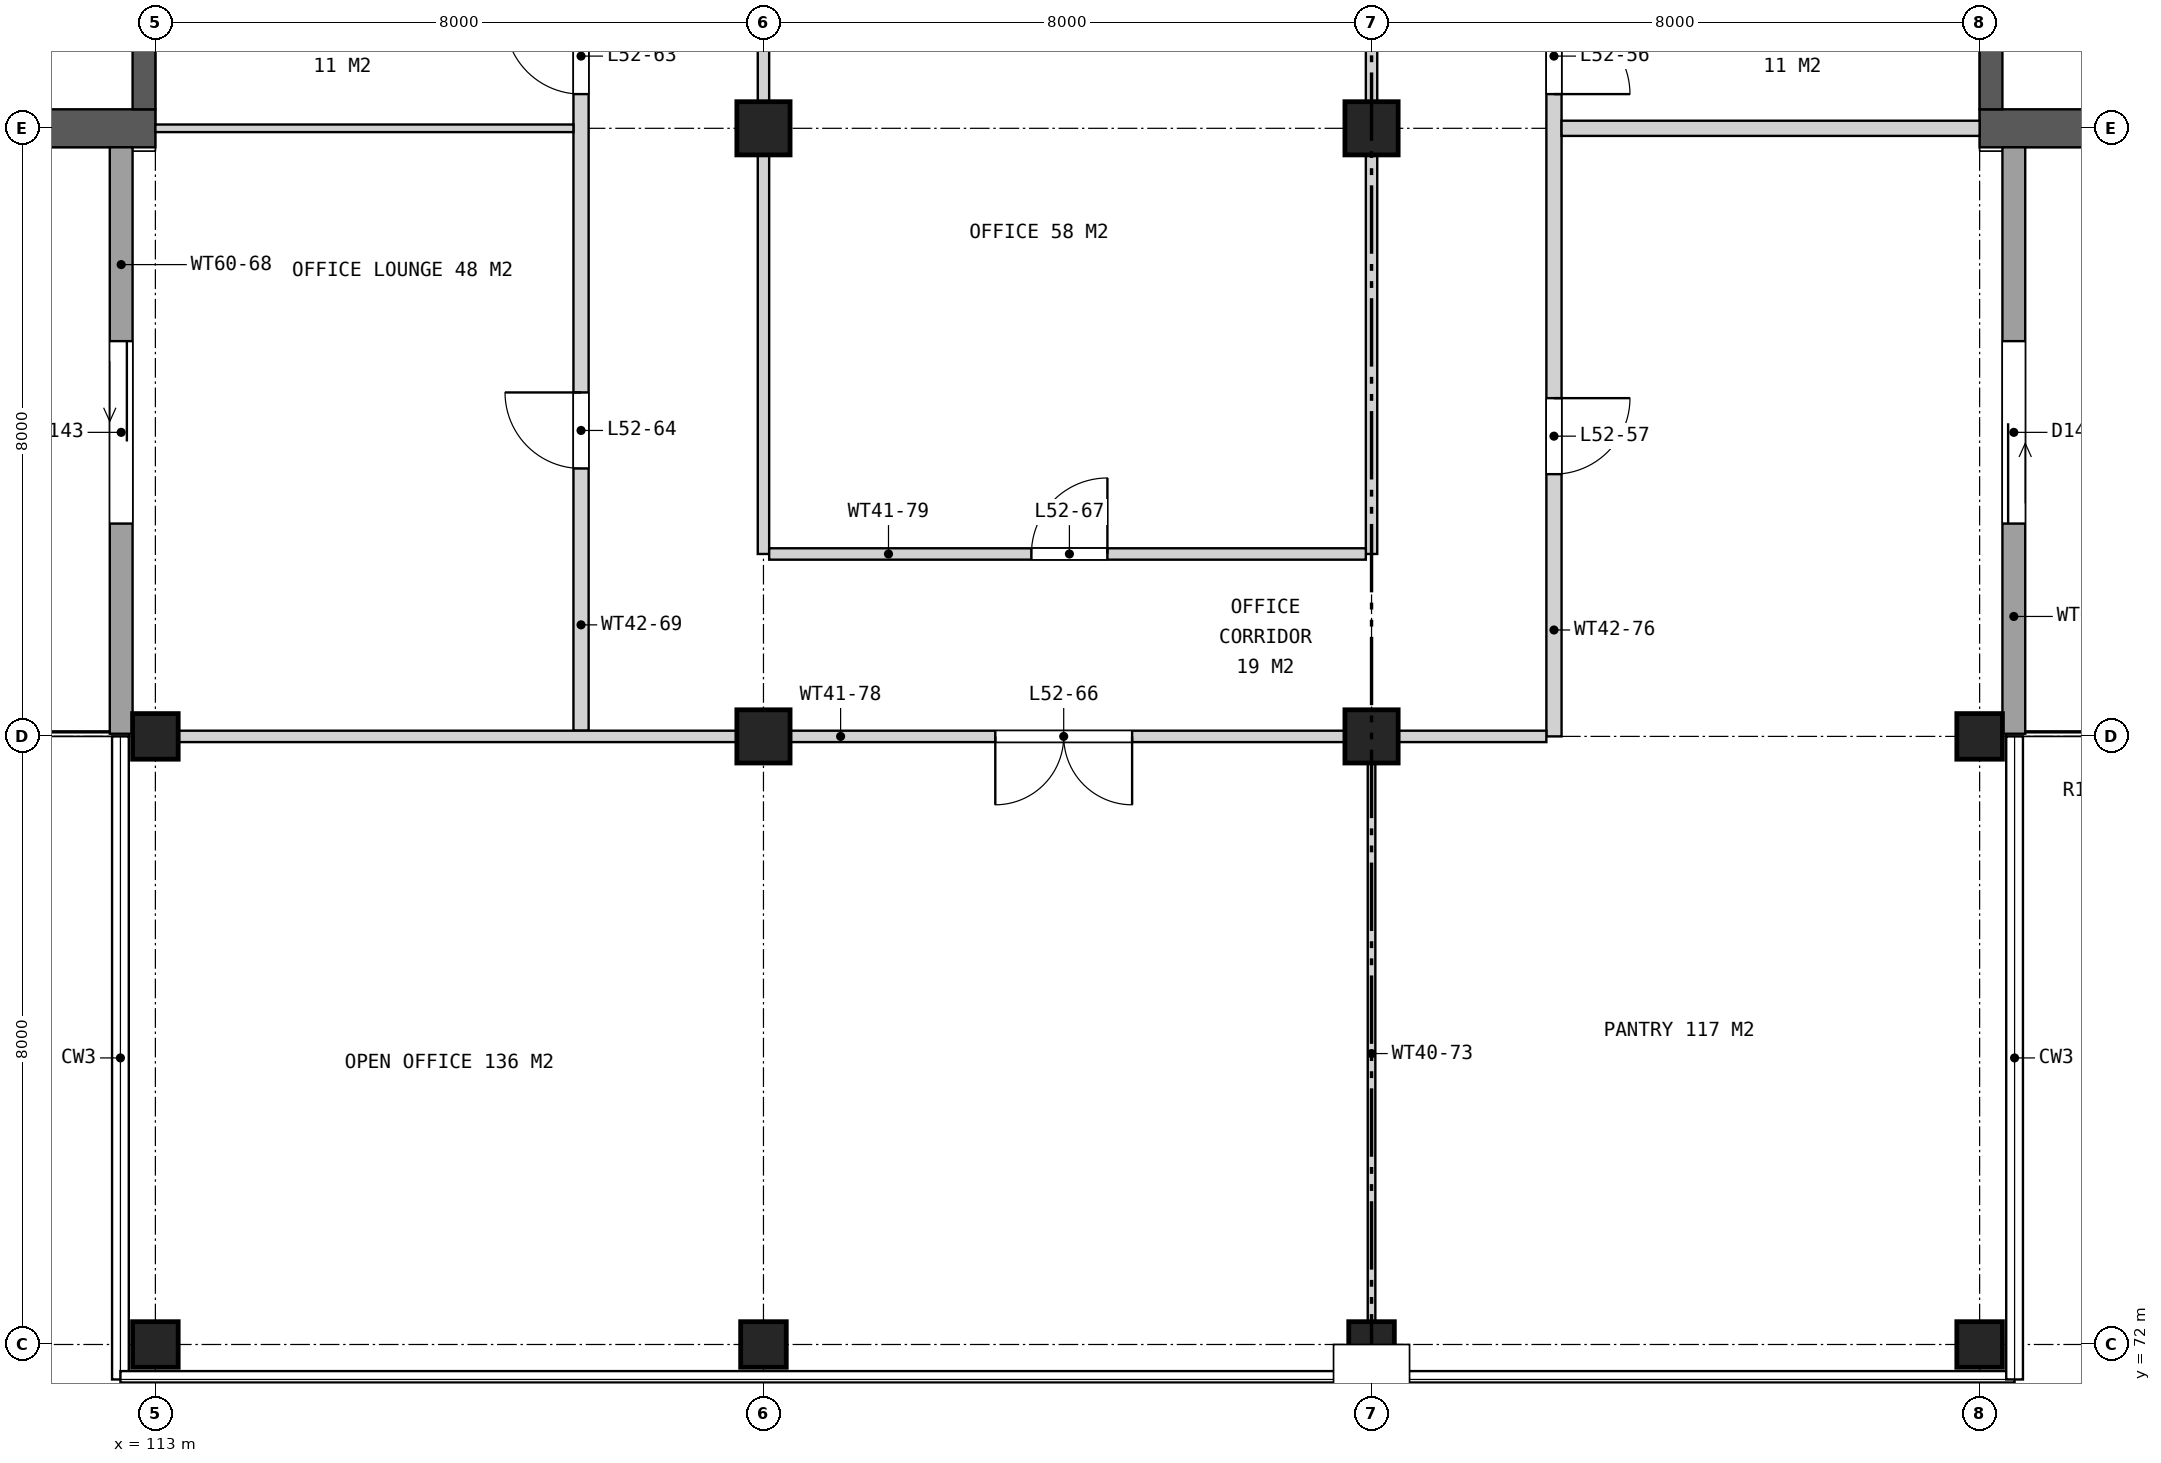
"""IFC4 building model, lengths in metres.
Left out: names, types, materials, properties, quantities, classifications, styles, units other than length and angle.
Written with IfcOpenShell. Run it as: python <this file> out.ifc"""

import sys

from ifc_helpers import new_model, si_unit, direction, frame, frame_2d, origin, origin_2d, place, context, subcontext, project, spatial, rectangle, extrude, element, fill, save


model = new_model("IFC4")
c1 = context("Model", 3, precision=1e-05, world=origin(), true_north=direction((0.0, 1.0)))
c2 = subcontext(c1, "Body", "Model", "MODEL_VIEW")
j1 = project(units=[si_unit("LENGTHUNIT", "METRE"), si_unit("PLANEANGLEUNIT", "RADIAN")], contexts=[c1])
p1 = place(None, origin())
s1 = spatial("IfcSite", under=j1, at=p1, CompositionType="ELEMENT")
p2 = place(p1, origin())
s2 = spatial("IfcBuilding", under=s1, at=p2, CompositionType="ELEMENT")
p3 = place(p2, frame((0.0, 0.0, 245.1)))
s3 = spatial("IfcBuildingStorey", under=s2, at=p3, CompositionType="ELEMENT", Elevation=245.1)
for number, where, z_axis, x_axis in (
    (1, (113.0, 72.0, 0.0), (0.0, 0.0, 1.0), (1.0, 0.0, 0.0)),
    (2, (113.0, 80.0, 0.0), (0.0, 0.0, 1.0), (1.0, 0.0, 0.0)),
    (3, (121.0, 72.0, 0.0), (0.0, 0.0, 1.0), (1.0, 0.0, 0.0)),
):
    element("IfcColumn", number, at=place(p3, frame(where, z_axis=z_axis, x_axis=x_axis)), inside=s3, PredefinedType="COLUMN", context=c2, shape_type="SweptSolid", body=[
        extrude(rectangle(XDim=0.6, YDim=0.6, at=origin_2d()), origin(), (0.0, 0.0, 1.0), 4.2),
    ])
for number, where, z_axis, x_axis in (
    (4, (121.0, 80.0, 0.0), (0.0, 0.0, 1.0), (1.0, 0.0, 0.0)),
    (5, (121.0, 88.0, 0.0), (0.0, 0.0, 1.0), (1.0, 0.0, 0.0)),
):
    element("IfcColumn", number, at=place(p3, frame(where, z_axis=z_axis, x_axis=x_axis)), inside=s3, PredefinedType="COLUMN", context=c2, shape_type="SweptSolid", body=[
        extrude(rectangle(XDim=0.7, YDim=0.7, at=origin_2d()), origin(), (0.0, 0.0, 1.0), 4.2),
    ])
p4 = place(p3, frame((129.0, 72.0, 0.0), z_axis=(0.0, 0.0, 1.0), x_axis=(1.0, 0.0, 0.0)))
e6 = element("IfcColumn", 6, at=p4, inside=s3, PredefinedType="COLUMN", context=c2, shape_type="SweptSolid", body=[
    extrude(rectangle(XDim=0.6, YDim=0.6, at=origin_2d()), origin(), (0.0, 0.0, 1.0), 4.2),
])
for number, where, z_axis, x_axis in (
    (7, (129.0, 80.0, 0.0), (0.0, 0.0, 1.0), (1.0, 0.0, 0.0)),
    (8, (129.0, 88.0, 0.0), (0.0, 0.0, 1.0), (1.0, 0.0, 0.0)),
):
    element("IfcColumn", number, at=place(p3, frame(where, z_axis=z_axis, x_axis=x_axis)), inside=s3, PredefinedType="COLUMN", context=c2, shape_type="SweptSolid", body=[
        extrude(rectangle(XDim=0.7, YDim=0.7, at=origin_2d()), origin(), (0.0, 0.0, 1.0), 4.2),
    ])
for number, where, z_axis, x_axis in (
    (9, (137.0, 72.0, 0.0), (0.0, 0.0, 1.0), (1.0, 0.0, 0.0)),
    (10, (137.0, 80.0, 0.0), (0.0, 0.0, 1.0), (1.0, 0.0, 0.0)),
):
    element("IfcColumn", number, at=place(p3, frame(where, z_axis=z_axis, x_axis=x_axis)), inside=s3, PredefinedType="COLUMN", context=c2, shape_type="SweptSolid", body=[
        extrude(rectangle(XDim=0.6, YDim=0.6, at=origin_2d()), origin(), (0.0, 0.0, 1.0), 4.2),
    ])
p5 = place(p3, frame((137.0, 88.0, 0.0), z_axis=(0.0, 0.0, 1.0), x_axis=(1.0, 0.0, 0.0)))
e11 = element("IfcWall", 11, at=p5, inside=s3, PredefinedType="SHEAR", context=c2, shape_type="SweptSolid", body=[
    extrude(rectangle(XDim=7.1, YDim=0.5, at=frame_2d((3.55, 0.0))), origin(), (0.0, 0.0, 1.0), 4.2),
])
p6 = place(p3, frame((137.15, 88.25, 0.0), z_axis=(0.0, 0.0, 1.0), x_axis=(0.0, 1.0, 0.0)))
e12 = element("IfcWall", 12, at=p6, inside=s3, PredefinedType="SHEAR", context=c2, shape_type="SweptSolid", body=[
    extrude(rectangle(XDim=6.05, YDim=0.3, at=frame_2d((3.025, 0.0))), origin(), (0.0, 0.0, 1.0), 4.2),
])
p7 = place(p3, frame((113.0, 88.0, 0.0), z_axis=(0.0, 0.0, 1.0), x_axis=(-1.0, 0.0, 0.0)))
e13 = element("IfcWall", 13, at=p7, inside=s3, PredefinedType="SHEAR", context=c2, shape_type="SweptSolid", body=[
    extrude(rectangle(XDim=7.1, YDim=0.5, at=frame_2d((3.55, 0.0))), origin(), (0.0, 0.0, 1.0), 4.2),
])
p8 = place(p3, frame((112.85, 94.3, 0.0), z_axis=(0.0, 0.0, 1.0), x_axis=(0.0, -1.0, 0.0)))
e14 = element("IfcWall", 14, at=p8, inside=s3, PredefinedType="SHEAR", context=c2, shape_type="SweptSolid", body=[
    extrude(rectangle(XDim=6.05, YDim=0.3, at=frame_2d((3.025, 0.0))), origin(), (0.0, 0.0, 1.0), 4.2),
])
p9 = place(p3, frame((112.55, 87.75, 0.0), z_axis=(0.0, 0.0, 1.0), x_axis=(0.0, -1.0, 0.0)))
e15 = element("IfcWall", 15, at=p9, inside=s3, PredefinedType="SOLIDWALL", context=c2, shape_type="SweptSolid", body=[
    extrude(rectangle(XDim=7.715, YDim=0.3, at=frame_2d((3.857, 0.0))), origin(), (0.0, 0.0, 1.0), 3.9),
])
p10 = place(p9, frame((2.55, 0.0, 0.0)))
e16 = element("IfcOpeningElement", 16, at=p10, cuts=e15, PredefinedType="OPENING", context=c2, shape_type="SweptSolid", body=[
    extrude(rectangle(XDim=2.4, YDim=2.4, at=frame_2d((1.2, 1.2))), frame((0.0, 0.16, 0.0), z_axis=(0.0, -1.0, 0.0), x_axis=(1.0, 0.0, 0.0)), (0.0, 0.0, 1.0), 0.32),
])
p11 = place(p3, frame((137.45, 80.035, 0.0), z_axis=(0.0, 0.0, 1.0), x_axis=(0.0, 1.0, 0.0)))
e17 = element("IfcWall", 17, at=p11, inside=s3, PredefinedType="SOLIDWALL", context=c2, shape_type="SweptSolid", body=[
    extrude(rectangle(XDim=7.715, YDim=0.3, at=frame_2d((3.857, 0.0))), origin(), (0.0, 0.0, 1.0), 3.9),
])
p12 = place(p11, frame((2.765, 0.0, 0.0)))
e18 = element("IfcOpeningElement", 18, at=p12, cuts=e17, PredefinedType="OPENING", context=c2, shape_type="SweptSolid", body=[
    extrude(rectangle(XDim=2.4, YDim=2.4, at=frame_2d((1.2, 1.2))), frame((0.0, 0.16, 0.0), z_axis=(0.0, -1.0, 0.0), x_axis=(1.0, 0.0, 0.0)), (0.0, 0.0, 1.0), 0.32),
])
p13 = place(p3, frame((118.6, 80.075, 0.0), z_axis=(0.0, 0.0, 1.0), x_axis=(0.0, 1.0, 0.0)))
e19 = element("IfcWall", 19, at=p13, inside=s3, PredefinedType="SOLIDWALL", context=c2, shape_type="SweptSolid", body=[
    extrude(rectangle(XDim=13.925, YDim=0.2, at=frame_2d((6.962, 0.0))), origin(), (0.0, 0.0, 1.0), 3.443),
])
p14 = place(p13, frame((12.375, 0.0, 0.0)))
e20 = element("IfcOpeningElement", 20, at=p14, cuts=e19, PredefinedType="OPENING", context=c2, shape_type="SweptSolid", body=[
    extrude(rectangle(XDim=1.0, YDim=2.1, at=frame_2d((0.5, 1.05))), frame((0.0, 0.11, 0.0), z_axis=(0.0, -1.0, 0.0), x_axis=(1.0, 0.0, 0.0)), (0.0, 0.0, 1.0), 0.22),
])
p15 = place(p13, frame((10.375, 0.0, 0.0)))
e21 = element("IfcOpeningElement", 21, at=p15, cuts=e19, PredefinedType="OPENING", context=c2, shape_type="SweptSolid", body=[
    extrude(rectangle(XDim=1.0, YDim=2.1, at=frame_2d((0.5, 1.05))), frame((0.0, 0.11, 0.0), z_axis=(0.0, -1.0, 0.0), x_axis=(1.0, 0.0, 0.0)), (0.0, 0.0, 1.0), 0.22),
])
p16 = place(p13, frame((8.375, 0.0, 0.0)))
e22 = element("IfcOpeningElement", 22, at=p16, cuts=e19, PredefinedType="OPENING", context=c2, shape_type="SweptSolid", body=[
    extrude(rectangle(XDim=1.0, YDim=2.1, at=frame_2d((0.5, 1.05))), frame((0.0, 0.11, 0.0), z_axis=(0.0, -1.0, 0.0), x_axis=(1.0, 0.0, 0.0)), (0.0, 0.0, 1.0), 0.22),
])
p17 = place(p13, frame((3.45, 0.0, 0.0)))
e23 = element("IfcOpeningElement", 23, at=p17, cuts=e19, PredefinedType="OPENING", context=c2, shape_type="SweptSolid", body=[
    extrude(rectangle(XDim=1.0, YDim=2.1, at=frame_2d((0.5, 1.05))), frame((0.0, 0.11, 0.0), z_axis=(0.0, -1.0, 0.0), x_axis=(1.0, 0.0, 0.0)), (0.0, 0.0, 1.0), 0.22),
])
p18 = place(p3, frame((121.0, 82.4, 0.0), z_axis=(0.0, 0.0, 1.0), x_axis=(0.0, 1.0, 0.0)))
e24 = element("IfcWall", 24, at=p18, inside=s3, PredefinedType="PARTITIONING", context=c2, shape_type="SweptSolid", body=[
    extrude(rectangle(XDim=35.2, YDim=0.15, at=frame_2d((17.6, 0.0))), origin(), (0.0, 0.0, 1.0), 3.443),
])
p19 = place(p18, frame((10.65, 0.0, 0.0)))
e25 = element("IfcOpeningElement", 25, at=p19, cuts=e24, PredefinedType="OPENING", context=c2, shape_type="SweptSolid", body=[
    extrude(rectangle(XDim=1.0, YDim=2.1, at=frame_2d((0.5, 1.05))), frame((0.0, 0.085, 0.0), z_axis=(0.0, -1.0, 0.0), x_axis=(1.0, 0.0, 0.0)), (0.0, 0.0, 1.0), 0.17),
])
p20 = place(p18, frame((18.75, 0.0, 0.0)))
e26 = element("IfcOpeningElement", 26, at=p20, cuts=e24, PredefinedType="OPENING", context=c2, shape_type="SweptSolid", body=[
    extrude(rectangle(XDim=1.0, YDim=2.1, at=frame_2d((0.5, 1.05))), frame((0.0, 0.085, 0.0), z_axis=(0.0, -1.0, 0.0), x_axis=(1.0, 0.0, 0.0)), (0.0, 0.0, 1.0), 0.17),
])
p21 = place(p18, frame((26.35, 0.0, 0.0)))
e27 = element("IfcOpeningElement", 27, at=p21, cuts=e24, PredefinedType="OPENING", context=c2, shape_type="SweptSolid", body=[
    extrude(rectangle(XDim=1.0, YDim=2.1, at=frame_2d((0.5, 1.05))), frame((0.0, 0.085, 0.0), z_axis=(0.0, -1.0, 0.0), x_axis=(1.0, 0.0, 0.0)), (0.0, 0.0, 1.0), 0.17),
])
p22 = place(p3, frame((129.0, 71.73, 0.0), z_axis=(0.0, 0.0, 1.0), x_axis=(0.0, 1.0, 0.0)))
e28 = element("IfcWall", 28, at=p22, inside=s3, PredefinedType="PARTITIONING", context=c2, shape_type="SweptSolid", body=[
    extrude(rectangle(XDim=8.195, YDim=0.1, at=frame_2d((4.098, 0.0))), origin(), (0.0, 0.0, 1.0), 3.443),
])
p23 = place(p3, frame((129.0, 82.4, 0.0), z_axis=(0.0, 0.0, 1.0), x_axis=(0.0, 1.0, 0.0)))
e29 = element("IfcWall", 29, at=p23, inside=s3, PredefinedType="PARTITIONING", context=c2, shape_type="SweptSolid", body=[
    extrude(rectangle(XDim=35.2, YDim=0.15, at=frame_2d((17.6, 0.0))), origin(), (0.0, 0.0, 1.0), 3.443),
])
p24 = place(p23, frame((18.75, 0.0, 0.0)))
e30 = element("IfcOpeningElement", 30, at=p24, cuts=e29, PredefinedType="OPENING", context=c2, shape_type="SweptSolid", body=[
    extrude(rectangle(XDim=1.0, YDim=2.1, at=frame_2d((0.5, 1.05))), frame((0.0, 0.085, 0.0), z_axis=(0.0, -1.0, 0.0), x_axis=(1.0, 0.0, 0.0)), (0.0, 0.0, 1.0), 0.17),
])
p25 = place(p3, frame((131.4, 80.0, 0.0), z_axis=(0.0, 0.0, 1.0), x_axis=(0.0, 1.0, 0.0)))
e31 = element("IfcWall", 31, at=p25, inside=s3, PredefinedType="SOLIDWALL", context=c2, shape_type="SweptSolid", body=[
    extrude(rectangle(XDim=14.0, YDim=0.2, at=frame_2d((7.0, 0.0))), origin(), (0.0, 0.0, 1.0), 3.443),
])
p26 = place(p25, frame((12.45, 0.0, 0.0)))
e32 = element("IfcOpeningElement", 32, at=p26, cuts=e31, PredefinedType="OPENING", context=c2, shape_type="SweptSolid", body=[
    extrude(rectangle(XDim=1.0, YDim=2.1, at=frame_2d((0.5, 1.05))), frame((0.0, 0.11, 0.0), z_axis=(0.0, -1.0, 0.0), x_axis=(1.0, 0.0, 0.0)), (0.0, 0.0, 1.0), 0.22),
])
p27 = place(p25, frame((10.45, 0.0, 0.0)))
e33 = element("IfcOpeningElement", 33, at=p27, cuts=e31, PredefinedType="OPENING", context=c2, shape_type="SweptSolid", body=[
    extrude(rectangle(XDim=1.0, YDim=2.1, at=frame_2d((0.5, 1.05))), frame((0.0, 0.11, 0.0), z_axis=(0.0, -1.0, 0.0), x_axis=(1.0, 0.0, 0.0)), (0.0, 0.0, 1.0), 0.22),
])
p28 = place(p25, frame((8.45, 0.0, 0.0)))
e34 = element("IfcOpeningElement", 34, at=p28, cuts=e31, PredefinedType="OPENING", context=c2, shape_type="SweptSolid", body=[
    extrude(rectangle(XDim=1.0, YDim=2.1, at=frame_2d((0.5, 1.05))), frame((0.0, 0.11, 0.0), z_axis=(0.0, -1.0, 0.0), x_axis=(1.0, 0.0, 0.0)), (0.0, 0.0, 1.0), 0.22),
])
p29 = place(p25, frame((3.45, 0.0, 0.0)))
e35 = element("IfcOpeningElement", 35, at=p29, cuts=e31, PredefinedType="OPENING", context=c2, shape_type="SweptSolid", body=[
    extrude(rectangle(XDim=1.0, YDim=2.1, at=frame_2d((0.5, 1.05))), frame((0.0, 0.11, 0.0), z_axis=(0.0, -1.0, 0.0), x_axis=(1.0, 0.0, 0.0)), (0.0, 0.0, 1.0), 0.22),
])
p30 = place(p3, frame((112.73, 80.0, 0.0), z_axis=(0.0, 0.0, 1.0), x_axis=(1.0, 0.0, 0.0)))
e36 = element("IfcWall", 36, at=p30, inside=s3, PredefinedType="PARTITIONING", context=c2, shape_type="SweptSolid", body=[
    extrude(rectangle(XDim=18.57, YDim=0.15, at=frame_2d((9.285, 0.0))), origin(), (0.0, 0.0, 1.0), 3.443),
])
p31 = place(p30, frame((11.32, 0.0, 0.0)))
e37 = element("IfcOpeningElement", 37, at=p31, cuts=e36, PredefinedType="OPENING", context=c2, shape_type="SweptSolid", body=[
    extrude(rectangle(XDim=1.8, YDim=2.1, at=frame_2d((0.9, 1.05))), frame((0.0, 0.085, 0.0), z_axis=(0.0, -1.0, 0.0), x_axis=(1.0, 0.0, 0.0)), (0.0, 0.0, 1.0), 0.17),
])
p32 = place(p3, frame((121.075, 82.4, 0.0), z_axis=(0.0, 0.0, 1.0), x_axis=(1.0, 0.0, 0.0)))
e38 = element("IfcWall", 38, at=p32, inside=s3, PredefinedType="PARTITIONING", context=c2, shape_type="SweptSolid", body=[
    extrude(rectangle(XDim=7.85, YDim=0.15, at=frame_2d((3.925, 0.0))), origin(), (0.0, 0.0, 1.0), 3.443),
])
p33 = place(p32, frame((3.45, 0.0, 0.0)))
e39 = element("IfcOpeningElement", 39, at=p33, cuts=e38, PredefinedType="OPENING", context=c2, shape_type="SweptSolid", body=[
    extrude(rectangle(XDim=1.0, YDim=2.1, at=frame_2d((0.5, 1.05))), frame((0.0, 0.085, 0.0), z_axis=(0.0, -1.0, 0.0), x_axis=(1.0, 0.0, 0.0)), (0.0, 0.0, 1.0), 0.17),
])
p34 = place(p3, frame((113.0, 88.0, 0.0), z_axis=(0.0, 0.0, 1.0), x_axis=(1.0, 0.0, 0.0)))
e40 = element("IfcWall", 40, at=p34, inside=s3, PredefinedType="PARTITIONING", context=c2, shape_type="SweptSolid", body=[
    extrude(rectangle(XDim=5.5, YDim=0.1, at=frame_2d((2.75, 0.0))), origin(), (0.0, 0.0, 1.0), 3.443),
])
p35 = place(p3, frame((131.5, 88.0, 0.0), z_axis=(0.0, 0.0, 1.0), x_axis=(1.0, 0.0, 0.0)))
e41 = element("IfcWall", 41, at=p35, inside=s3, PredefinedType="SOLIDWALL", context=c2, shape_type="SweptSolid", body=[
    extrude(rectangle(XDim=5.5, YDim=0.2, at=frame_2d((2.75, 0.0))), origin(), (0.0, 0.0, 1.0), 3.443),
])
p36 = place(p10, frame((2.4, 0.0, 0.0), z_axis=(0.0, 0.0, 1.0), x_axis=(-1.0, 0.0, 0.0)))
e42 = element("IfcDoor", 42, at=p36, inside=s3, OperationType="SLIDING_TO_LEFT", PredefinedType="DOOR", context=c2, shape_type="SweptSolid", body=[
    extrude(rectangle(XDim=2.4, YDim=2.4, at=frame_2d((1.2, 1.2))), frame((0.0, 0.025, 0.0), z_axis=(0.0, -1.0, 0.0), x_axis=(1.0, 0.0, 0.0)), (0.0, 0.0, 1.0), 0.05),
])
fill(e16, e42)
p37 = place(p12, frame((2.4, 0.0, 0.0), z_axis=(0.0, 0.0, 1.0), x_axis=(-1.0, 0.0, 0.0)))
e43 = element("IfcDoor", 43, at=p37, inside=s3, OperationType="SLIDING_TO_LEFT", PredefinedType="DOOR", context=c2, shape_type="SweptSolid", body=[
    extrude(rectangle(XDim=2.4, YDim=2.4, at=frame_2d((1.2, 1.2))), frame((0.0, 0.025, 0.0), z_axis=(0.0, -1.0, 0.0), x_axis=(1.0, 0.0, 0.0)), (0.0, 0.0, 1.0), 0.05),
])
fill(e18, e43)
p38 = place(p28, frame((1.0, 0.0, 0.0), z_axis=(0.0, 0.0, 1.0), x_axis=(-1.0, 0.0, 0.0)))
e44 = element("IfcDoor", 44, at=p38, inside=s3, OperationType="SINGLE_SWING_RIGHT", PredefinedType="DOOR", context=c2, shape_type="SweptSolid", body=[
    extrude(rectangle(XDim=1.0, YDim=2.1, at=frame_2d((0.5, 1.05))), frame((0.0, 0.025, 0.0), z_axis=(0.0, -1.0, 0.0), x_axis=(1.0, 0.0, 0.0)), (0.0, 0.0, 1.0), 0.05),
])
fill(e34, e44)
p39 = place(p29, frame((1.0, 0.0, 0.0), z_axis=(0.0, 0.0, 1.0), x_axis=(-1.0, 0.0, 0.0)))
e45 = element("IfcDoor", 45, at=p39, inside=s3, OperationType="SINGLE_SWING_LEFT", PredefinedType="DOOR", context=c2, shape_type="SweptSolid", body=[
    extrude(rectangle(XDim=1.0, YDim=2.1, at=frame_2d((0.5, 1.05))), frame((0.0, 0.025, 0.0), z_axis=(0.0, -1.0, 0.0), x_axis=(1.0, 0.0, 0.0)), (0.0, 0.0, 1.0), 0.05),
])
fill(e35, e45)
p40 = place(p16, origin())
e46 = element("IfcDoor", 46, at=p40, inside=s3, OperationType="SINGLE_SWING_RIGHT", PredefinedType="DOOR", context=c2, shape_type="SweptSolid", body=[
    extrude(rectangle(XDim=1.0, YDim=2.1, at=frame_2d((0.5, 1.05))), frame((0.0, 0.025, 0.0), z_axis=(0.0, -1.0, 0.0), x_axis=(1.0, 0.0, 0.0)), (0.0, 0.0, 1.0), 0.05),
])
fill(e22, e46)
p41 = place(p17, origin())
e47 = element("IfcDoor", 47, at=p41, inside=s3, OperationType="SINGLE_SWING_RIGHT", PredefinedType="DOOR", context=c2, shape_type="SweptSolid", body=[
    extrude(rectangle(XDim=1.0, YDim=2.1, at=frame_2d((0.5, 1.05))), frame((0.0, 0.025, 0.0), z_axis=(0.0, -1.0, 0.0), x_axis=(1.0, 0.0, 0.0)), (0.0, 0.0, 1.0), 0.05),
])
fill(e23, e47)
p42 = place(p31, frame((1.8, 0.0, 0.0), z_axis=(0.0, 0.0, 1.0), x_axis=(-1.0, 0.0, 0.0)))
e48 = element("IfcDoor", 48, at=p42, inside=s3, OperationType="DOUBLE_DOOR_SINGLE_SWING", PredefinedType="DOOR", context=c2, shape_type="SweptSolid", body=[
    extrude(rectangle(XDim=1.8, YDim=2.1, at=frame_2d((0.9, 1.05))), frame((0.0, 0.025, 0.0), z_axis=(0.0, -1.0, 0.0), x_axis=(1.0, 0.0, 0.0)), (0.0, 0.0, 1.0), 0.05),
])
fill(e37, e48)
p43 = place(p33, origin())
e49 = element("IfcDoor", 49, at=p43, inside=s3, OperationType="SINGLE_SWING_RIGHT", PredefinedType="DOOR", context=c2, shape_type="SweptSolid", body=[
    extrude(rectangle(XDim=1.0, YDim=2.1, at=frame_2d((0.5, 1.05))), frame((0.0, 0.025, 0.0), z_axis=(0.0, -1.0, 0.0), x_axis=(1.0, 0.0, 0.0)), (0.0, 0.0, 1.0), 0.05),
])
fill(e39, e49)
save(model, sys.argv[1])
